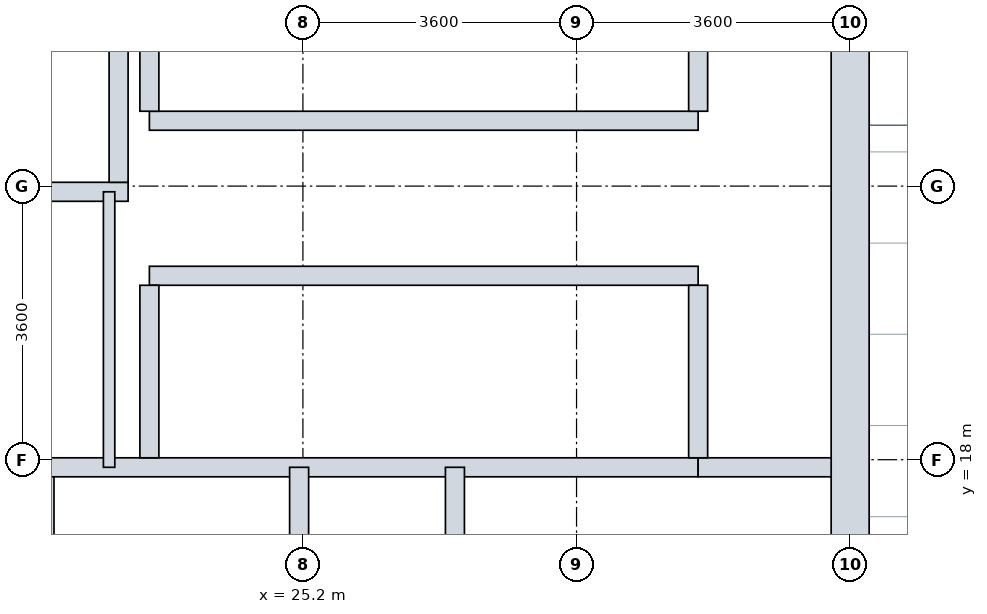
"""IFC4 building model, lengths in metres.
Left out: names, types, materials, properties, quantities, classifications, styles, units other than length and angle.
Written with IfcOpenShell. Run it as: python <this file> out.ifc"""

import sys

from ifc_helpers import new_model, si_unit, direction, frame, frame_2d, origin, place, context, subcontext, project, spatial, rectangle, extrude, element, fill, save


model = new_model("IFC4")
c1 = context("Model", 3, precision=1e-05, world=origin(), true_north=direction((0.0, 1.0)))
c2 = subcontext(c1, "Body", "Model", "MODEL_VIEW")
j1 = project(units=[si_unit("LENGTHUNIT", "METRE"), si_unit("PLANEANGLEUNIT", "RADIAN")], contexts=[c1])
p1 = place(None, origin())
s1 = spatial("IfcSite", under=j1, at=p1, CompositionType="ELEMENT")
p2 = place(p1, origin())
s2 = spatial("IfcBuilding", under=s1, at=p2, CompositionType="ELEMENT")
p3 = place(p2, frame((0.0, 0.0, 209.0)))
s3 = spatial("IfcBuildingStorey", under=s2, at=p3, CompositionType="ELEMENT", Elevation=209.0)
p4 = place(p3, frame((32.4, 10.8, 0.0), z_axis=(0.0, 0.0, 1.0), x_axis=(0.0, 1.0, 0.0)))
e1 = element("IfcWall", 1, at=p4, inside=s3, PredefinedType="SHEAR", context=c2, shape_type="SweptSolid", body=[
    extrude(rectangle(XDim=14.4, YDim=0.5, at=frame_2d((7.2, 0.0))), origin(), (0.0, 0.0, 1.0), 4.55),
])
p5 = place(p4, frame((4.35, 0.0, 0.0)))
e2 = element("IfcOpeningElement", 2, at=p5, cuts=e1, PredefinedType="OPENING", context=c2, shape_type="SweptSolid", body=[
    extrude(rectangle(XDim=1.2, YDim=2.1, at=frame_2d((0.6, 1.05))), frame((0.0, 0.26, 0.0), z_axis=(0.0, -1.0, 0.0), x_axis=(1.0, 0.0, 0.0)), (0.0, 0.0, 1.0), 0.52),
])
p6 = place(p4, frame((10.0, 0.0, 0.0)))
e3 = element("IfcOpeningElement", 3, at=p6, cuts=e1, PredefinedType="OPENING", context=c2, shape_type="SweptSolid", body=[
    extrude(rectangle(XDim=1.2, YDim=2.1, at=frame_2d((0.6, 1.05))), frame((0.0, 0.26, 0.0), z_axis=(0.0, -1.0, 0.0), x_axis=(1.0, 0.0, 0.0)), (0.0, 0.0, 1.0), 0.52),
])
p7 = place(p3, frame((14.65, 21.525, 0.0), z_axis=(0.0, 0.0, 1.0), x_axis=(1.0, 0.0, 0.0)))
e4 = element("IfcWall", 4, at=p7, inside=s3, PredefinedType="SHEAR", context=c2, shape_type="SweptSolid", body=[
    extrude(rectangle(XDim=8.25, YDim=0.25, at=frame_2d((4.125, 0.0))), origin(), (0.0, 0.0, 1.0), 4.55),
])
p8 = place(p3, frame((22.775, 21.65, 0.0), z_axis=(0.0, 0.0, 1.0), x_axis=(0.0, 1.0, 0.0)))
e5 = element("IfcWall", 5, at=p8, inside=s3, PredefinedType="SHEAR", context=c2, shape_type="SweptSolid", body=[
    extrude(rectangle(XDim=2.84, YDim=0.25, at=frame_2d((1.42, 0.0))), origin(), (0.0, 0.0, 1.0), 4.55),
])
p9 = place(p3, frame((21.8, 14.84, 0.0), z_axis=(0.0, 0.0, 1.0), x_axis=(0.0, 1.0, 0.0)))
e6 = element("IfcWall", 6, at=p9, inside=s3, PredefinedType="PARTITIONING", context=c2, shape_type="SweptSolid", body=[
    extrude(rectangle(XDim=3.06, YDim=0.25, at=frame_2d((1.53, 0.0))), origin(), (0.0, 0.0, 1.0), 4.535),
])
p10 = place(p3, frame((21.88, 17.9, 0.0), z_axis=(0.0, 0.0, 1.0), x_axis=(1.0, 0.0, 0.0)))
e7 = element("IfcWall", 7, at=p10, inside=s3, PredefinedType="PARTITIONING", context=c2, shape_type="SweptSolid", body=[
    extrude(rectangle(XDim=8.52, YDim=0.25, at=frame_2d((4.26, 0.0))), origin(), (0.0, 0.0, 1.0), 4.535),
])
p11 = place(p3, frame((30.4, 17.9, 0.0), z_axis=(0.0, 0.0, 1.0), x_axis=(1.0, 0.0, 0.0)))
e8 = element("IfcWall", 8, at=p11, inside=s3, PredefinedType="PARTITIONING", context=c2, shape_type="SweptSolid", body=[
    extrude(rectangle(XDim=1.75, YDim=0.25, at=frame_2d((0.875, 0.0))), origin(), (0.0, 0.0, 1.0), 4.535),
])
p12 = place(p11, frame((0.32, 0.0, 0.0)))
e9 = element("IfcOpeningElement", 9, at=p12, cuts=e8, PredefinedType="OPENING", context=c2, shape_type="SweptSolid", body=[
    extrude(rectangle(XDim=1.1, YDim=2.1, at=frame_2d((0.55, 1.05))), frame((0.0, 0.135, 0.0), z_axis=(0.0, -1.0, 0.0), x_axis=(1.0, 0.0, 0.0)), (0.0, 0.0, 1.0), 0.27),
])
p13 = place(p3, frame((25.15, 14.84, 0.0), z_axis=(0.0, 0.0, 1.0), x_axis=(0.0, 1.0, 0.0)))
e10 = element("IfcWall", 10, at=p13, inside=s3, PredefinedType="PARTITIONING", context=c2, shape_type="SweptSolid", body=[
    extrude(rectangle(XDim=3.06, YDim=0.25, at=frame_2d((1.53, 0.0))), origin(), (0.0, 0.0, 1.0), 4.535),
])
p14 = place(p3, frame((27.2, 14.84, 0.0), z_axis=(0.0, 0.0, 1.0), x_axis=(0.0, 1.0, 0.0)))
e11 = element("IfcWall", 11, at=p14, inside=s3, PredefinedType="PARTITIONING", context=c2, shape_type="SweptSolid", body=[
    extrude(rectangle(XDim=3.06, YDim=0.25, at=frame_2d((1.53, 0.0))), origin(), (0.0, 0.0, 1.0), 4.535),
])
p15 = place(p14, frame((0.98, 0.0, 0.0)))
e12 = element("IfcOpeningElement", 12, at=p15, cuts=e11, PredefinedType="OPENING", context=c2, shape_type="SweptSolid", body=[
    extrude(rectangle(XDim=1.1, YDim=2.1, at=frame_2d((0.55, 1.05))), frame((0.0, 0.135, 0.0), z_axis=(0.0, -1.0, 0.0), x_axis=(1.0, 0.0, 0.0)), (0.0, 0.0, 1.0), 0.27),
])
p16 = place(p3, frame((23.18, 20.42, 0.0), z_axis=(0.0, 0.0, 1.0), x_axis=(1.0, 0.0, 0.0)))
e13 = element("IfcWall", 13, at=p16, inside=s3, PredefinedType="PARTITIONING", context=c2, shape_type="SweptSolid", body=[
    extrude(rectangle(XDim=7.22, YDim=0.25, at=frame_2d((3.61, 0.0))), origin(), (0.0, 0.0, 1.0), 4.535),
])
p17 = place(p16, frame((0.41, 0.0, 0.0)))
e14 = element("IfcOpeningElement", 14, at=p17, cuts=e13, PredefinedType="OPENING", context=c2, shape_type="SweptSolid", body=[
    extrude(rectangle(XDim=1.1, YDim=2.1, at=frame_2d((0.55, 1.05))), frame((0.0, 0.135, 0.0), z_axis=(0.0, -1.0, 0.0), x_axis=(1.0, 0.0, 0.0)), (0.0, 0.0, 1.0), 0.27),
])
p18 = place(p16, frame((2.19, 0.0, 0.0)))
e15 = element("IfcOpeningElement", 15, at=p18, cuts=e13, PredefinedType="OPENING", context=c2, shape_type="SweptSolid", body=[
    extrude(rectangle(XDim=1.1, YDim=2.1, at=frame_2d((0.55, 1.05))), frame((0.0, 0.135, 0.0), z_axis=(0.0, -1.0, 0.0), x_axis=(1.0, 0.0, 0.0)), (0.0, 0.0, 1.0), 0.27),
])
p19 = place(p16, frame((3.97, 0.0, 0.0)))
e16 = element("IfcOpeningElement", 16, at=p19, cuts=e13, PredefinedType="OPENING", context=c2, shape_type="SweptSolid", body=[
    extrude(rectangle(XDim=1.1, YDim=2.1, at=frame_2d((0.55, 1.05))), frame((0.0, 0.135, 0.0), z_axis=(0.0, -1.0, 0.0), x_axis=(1.0, 0.0, 0.0)), (0.0, 0.0, 1.0), 0.27),
])
p20 = place(p16, frame((5.75, 0.0, 0.0)))
e17 = element("IfcOpeningElement", 17, at=p20, cuts=e13, PredefinedType="OPENING", context=c2, shape_type="SweptSolid", body=[
    extrude(rectangle(XDim=1.1, YDim=2.1, at=frame_2d((0.55, 1.05))), frame((0.0, 0.135, 0.0), z_axis=(0.0, -1.0, 0.0), x_axis=(1.0, 0.0, 0.0)), (0.0, 0.0, 1.0), 0.27),
])
for number, where, z_axis, x_axis in (
    (18, (23.18, 18.025, 0.0), (0.0, 0.0, 1.0), (0.0, 1.0, 0.0)),
    (19, (30.4, 18.025, 0.0), (0.0, 0.0, 1.0), (0.0, 1.0, 0.0)),
):
    element("IfcWall", number, at=place(p3, frame(where, z_axis=z_axis, x_axis=x_axis)), inside=s3, PredefinedType="PARTITIONING", context=c2, shape_type="SweptSolid", body=[
        extrude(rectangle(XDim=2.27, YDim=0.25, at=frame_2d((1.135, 0.0))), origin(), (0.0, 0.0, 1.0), 4.535),
    ])
p21 = place(p3, frame((23.18, 22.46, 0.0), z_axis=(0.0, 0.0, 1.0), x_axis=(1.0, 0.0, 0.0)))
e20 = element("IfcWall", 20, at=p21, inside=s3, PredefinedType="PARTITIONING", context=c2, shape_type="SweptSolid", body=[
    extrude(rectangle(XDim=7.22, YDim=0.25, at=frame_2d((3.61, 0.0))), origin(), (0.0, 0.0, 1.0), 4.535),
])
p22 = place(p21, frame((0.41, 0.0, 0.0)))
e21 = element("IfcOpeningElement", 21, at=p22, cuts=e20, PredefinedType="OPENING", context=c2, shape_type="SweptSolid", body=[
    extrude(rectangle(XDim=1.1, YDim=2.1, at=frame_2d((0.55, 1.05))), frame((0.0, 0.135, 0.0), z_axis=(0.0, -1.0, 0.0), x_axis=(1.0, 0.0, 0.0)), (0.0, 0.0, 1.0), 0.27),
])
p23 = place(p21, frame((2.19, 0.0, 0.0)))
e22 = element("IfcOpeningElement", 22, at=p23, cuts=e20, PredefinedType="OPENING", context=c2, shape_type="SweptSolid", body=[
    extrude(rectangle(XDim=1.1, YDim=2.1, at=frame_2d((0.55, 1.05))), frame((0.0, 0.135, 0.0), z_axis=(0.0, -1.0, 0.0), x_axis=(1.0, 0.0, 0.0)), (0.0, 0.0, 1.0), 0.27),
])
p24 = place(p21, frame((3.97, 0.0, 0.0)))
e23 = element("IfcOpeningElement", 23, at=p24, cuts=e20, PredefinedType="OPENING", context=c2, shape_type="SweptSolid", body=[
    extrude(rectangle(XDim=1.1, YDim=2.1, at=frame_2d((0.55, 1.05))), frame((0.0, 0.135, 0.0), z_axis=(0.0, -1.0, 0.0), x_axis=(1.0, 0.0, 0.0)), (0.0, 0.0, 1.0), 0.27),
])
p25 = place(p21, frame((5.75, 0.0, 0.0)))
e24 = element("IfcOpeningElement", 24, at=p25, cuts=e20, PredefinedType="OPENING", context=c2, shape_type="SweptSolid", body=[
    extrude(rectangle(XDim=1.1, YDim=2.1, at=frame_2d((0.55, 1.05))), frame((0.0, 0.135, 0.0), z_axis=(0.0, -1.0, 0.0), x_axis=(1.0, 0.0, 0.0)), (0.0, 0.0, 1.0), 0.27),
])
for number, where, z_axis, x_axis in (
    (25, (23.18, 22.585, 0.0), (0.0, 0.0, 1.0), (0.0, 1.0, 0.0)),
    (26, (30.4, 22.585, 0.0), (0.0, 0.0, 1.0), (0.0, 1.0, 0.0)),
):
    element("IfcWall", number, at=place(p3, frame(where, z_axis=z_axis, x_axis=x_axis)), inside=s3, PredefinedType="PARTITIONING", context=c2, shape_type="SweptSolid", body=[
        extrude(rectangle(XDim=2.315, YDim=0.25, at=frame_2d((1.157, 0.0))), origin(), (0.0, 0.0, 1.0), 4.535),
    ])
p26 = place(p3, frame((22.65, 17.9, 0.0), z_axis=(0.0, 0.0, 1.0), x_axis=(0.0, 1.0, 0.0)))
e27 = element("IfcWall", 27, at=p26, inside=s3, PredefinedType="PARTITIONING", context=c2, shape_type="SweptSolid", body=[
    extrude(rectangle(XDim=3.625, YDim=0.15, at=frame_2d((1.812, 0.0))), origin(), (0.0, 0.0, 1.0), 4.535),
])
p27 = place(p26, frame((2.1, 0.0, 0.0)))
e28 = element("IfcOpeningElement", 28, at=p27, cuts=e27, PredefinedType="OPENING", context=c2, shape_type="SweptSolid", body=[
    extrude(rectangle(XDim=0.9, YDim=2.1, at=frame_2d((0.45, 1.05))), frame((0.0, 0.085, 0.0), z_axis=(0.0, -1.0, 0.0), x_axis=(1.0, 0.0, 0.0)), (0.0, 0.0, 1.0), 0.17),
])
p28 = place(p12, origin())
e29 = element("IfcDoor", 29, at=p28, inside=s3, OperationType="SINGLE_SWING_LEFT", PredefinedType="DOOR", context=c2, shape_type="SweptSolid", body=[
    extrude(rectangle(XDim=1.1, YDim=2.1, at=frame_2d((0.55, 1.05))), frame((0.0, 0.025, 0.0), z_axis=(0.0, -1.0, 0.0), x_axis=(1.0, 0.0, 0.0)), (0.0, 0.0, 1.0), 0.05),
])
fill(e9, e29)
p29 = place(p17, origin())
e30 = element("IfcDoor", 30, at=p29, inside=s3, OperationType="SLIDING_TO_LEFT", PredefinedType="DOOR", context=c2, shape_type="SweptSolid", body=[
    extrude(rectangle(XDim=1.1, YDim=2.1, at=frame_2d((0.55, 1.05))), frame((0.0, 0.025, 0.0), z_axis=(0.0, -1.0, 0.0), x_axis=(1.0, 0.0, 0.0)), (0.0, 0.0, 1.0), 0.05),
])
fill(e14, e30)
p30 = place(p18, origin())
e31 = element("IfcDoor", 31, at=p30, inside=s3, OperationType="SLIDING_TO_LEFT", PredefinedType="DOOR", context=c2, shape_type="SweptSolid", body=[
    extrude(rectangle(XDim=1.1, YDim=2.1, at=frame_2d((0.55, 1.05))), frame((0.0, 0.025, 0.0), z_axis=(0.0, -1.0, 0.0), x_axis=(1.0, 0.0, 0.0)), (0.0, 0.0, 1.0), 0.05),
])
fill(e15, e31)
p31 = place(p19, origin())
e32 = element("IfcDoor", 32, at=p31, inside=s3, OperationType="SLIDING_TO_LEFT", PredefinedType="DOOR", context=c2, shape_type="SweptSolid", body=[
    extrude(rectangle(XDim=1.1, YDim=2.1, at=frame_2d((0.55, 1.05))), frame((0.0, 0.025, 0.0), z_axis=(0.0, -1.0, 0.0), x_axis=(1.0, 0.0, 0.0)), (0.0, 0.0, 1.0), 0.05),
])
fill(e16, e32)
p32 = place(p20, origin())
e33 = element("IfcDoor", 33, at=p32, inside=s3, OperationType="SLIDING_TO_LEFT", PredefinedType="DOOR", context=c2, shape_type="SweptSolid", body=[
    extrude(rectangle(XDim=1.1, YDim=2.1, at=frame_2d((0.55, 1.05))), frame((0.0, 0.025, 0.0), z_axis=(0.0, -1.0, 0.0), x_axis=(1.0, 0.0, 0.0)), (0.0, 0.0, 1.0), 0.05),
])
fill(e17, e33)
p33 = place(p22, origin())
e34 = element("IfcDoor", 34, at=p33, inside=s3, OperationType="SLIDING_TO_LEFT", PredefinedType="DOOR", context=c2, shape_type="SweptSolid", body=[
    extrude(rectangle(XDim=1.1, YDim=2.1, at=frame_2d((0.55, 1.05))), frame((0.0, 0.025, 0.0), z_axis=(0.0, -1.0, 0.0), x_axis=(1.0, 0.0, 0.0)), (0.0, 0.0, 1.0), 0.05),
])
fill(e21, e34)
p34 = place(p23, origin())
e35 = element("IfcDoor", 35, at=p34, inside=s3, OperationType="SLIDING_TO_LEFT", PredefinedType="DOOR", context=c2, shape_type="SweptSolid", body=[
    extrude(rectangle(XDim=1.1, YDim=2.1, at=frame_2d((0.55, 1.05))), frame((0.0, 0.025, 0.0), z_axis=(0.0, -1.0, 0.0), x_axis=(1.0, 0.0, 0.0)), (0.0, 0.0, 1.0), 0.05),
])
fill(e22, e35)
p35 = place(p24, origin())
e36 = element("IfcDoor", 36, at=p35, inside=s3, OperationType="SLIDING_TO_LEFT", PredefinedType="DOOR", context=c2, shape_type="SweptSolid", body=[
    extrude(rectangle(XDim=1.1, YDim=2.1, at=frame_2d((0.55, 1.05))), frame((0.0, 0.025, 0.0), z_axis=(0.0, -1.0, 0.0), x_axis=(1.0, 0.0, 0.0)), (0.0, 0.0, 1.0), 0.05),
])
fill(e23, e36)
p36 = place(p25, origin())
e37 = element("IfcDoor", 37, at=p36, inside=s3, OperationType="SLIDING_TO_LEFT", PredefinedType="DOOR", context=c2, shape_type="SweptSolid", body=[
    extrude(rectangle(XDim=1.1, YDim=2.1, at=frame_2d((0.55, 1.05))), frame((0.0, 0.025, 0.0), z_axis=(0.0, -1.0, 0.0), x_axis=(1.0, 0.0, 0.0)), (0.0, 0.0, 1.0), 0.05),
])
fill(e24, e37)
p37 = place(p6, origin())
e38 = element("IfcDoor", 38, at=p37, inside=s3, OperationType="SINGLE_SWING_RIGHT", PredefinedType="DOOR", context=c2, shape_type="SweptSolid", body=[
    extrude(rectangle(XDim=1.2, YDim=2.1, at=frame_2d((0.6, 1.05))), frame((0.0, 0.025, 0.0), z_axis=(0.0, -1.0, 0.0), x_axis=(1.0, 0.0, 0.0)), (0.0, 0.0, 1.0), 0.05),
])
fill(e3, e38)
p38 = place(p27, origin())
e39 = element("IfcDoor", 39, at=p38, inside=s3, OperationType="SINGLE_SWING_LEFT", PredefinedType="DOOR", context=c2, shape_type="SweptSolid", body=[
    extrude(rectangle(XDim=0.9, YDim=2.1, at=frame_2d((0.45, 1.05))), frame((0.0, 0.025, 0.0), z_axis=(0.0, -1.0, 0.0), x_axis=(1.0, 0.0, 0.0)), (0.0, 0.0, 1.0), 0.05),
])
fill(e28, e39)
save(model, sys.argv[1])
